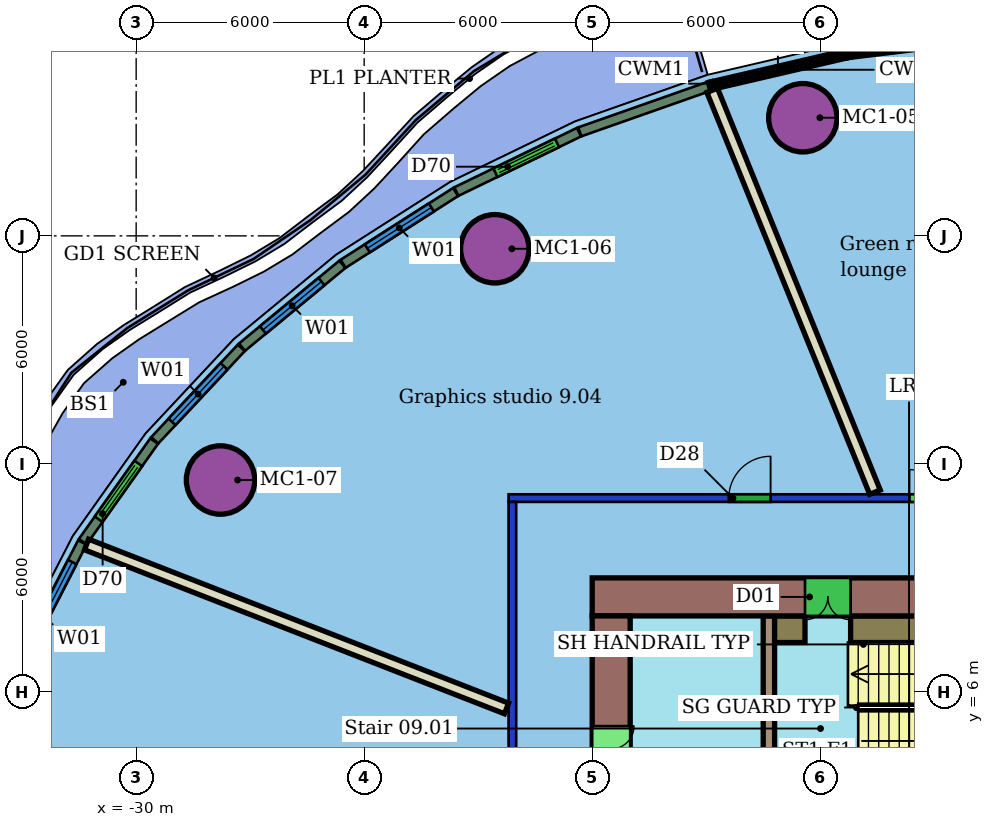
"""IFC4 building model, lengths in metres.
Left out: names, types, materials, properties, quantities, classifications, styles, units other than length and angle.
Written with IfcOpenShell. Run it as: python <this file> out.ifc"""

import sys

from ifc_helpers import new_model, si_unit, direction, frame, frame_2d, origin, origin_2d, place, context, subcontext, project, spatial, rectangle, hollow_circle, extrude, element, fill, save


model = new_model("IFC4")
c1 = context("Model", 3, precision=1e-05, world=origin(), true_north=direction((0.0, 1.0)))
c2 = subcontext(c1, "Body", "Model", "MODEL_VIEW")
j1 = project(units=[si_unit("LENGTHUNIT", "METRE"), si_unit("PLANEANGLEUNIT", "RADIAN")], contexts=[c1])
p1 = place(None, origin())
s1 = spatial("IfcSite", under=j1, at=p1, CompositionType="ELEMENT")
p2 = place(p1, origin())
s2 = spatial("IfcBuilding", under=s1, at=p2, CompositionType="ELEMENT")
p3 = place(p2, frame((0.0, 0.0, 50.8)))
s3 = spatial("IfcBuildingStorey", under=s2, at=p3, CompositionType="ELEMENT", Elevation=50.8)
for number, where, z_axis, x_axis in (
    (1, (-12.458, 21.108, 0.0), (0.0, 0.0, 1.0), (1.0, 0.0, 0.0)),
    (2, (-20.563, 17.66, 0.0), (0.0, 0.0, 1.0), (1.0, 0.0, 0.0)),
    (3, (-27.78, 11.576, 0.0), (0.0, 0.0, 1.0), (1.0, 0.0, 0.0)),
):
    element("IfcColumn", number, at=place(p3, frame(where, z_axis=z_axis, x_axis=x_axis)), inside=s3, PredefinedType="COLUMN", context=c2, shape_type="SweptSolid", body=[
        extrude(hollow_circle(Radius=0.9, WallThickness=0.06, at=origin_2d()), origin(), (0.0, 0.0, 1.0), 3.55),
    ])
p4 = place(p3, frame((-20.1, -11.0, 0.0), z_axis=(0.0, 0.0, 1.0), x_axis=(0.0, 1.0, 0.0)))
e4 = element("IfcWall", 4, at=p4, inside=s3, PredefinedType="PARTITIONING", context=c2, shape_type="SweptSolid", body=[
    extrude(rectangle(XDim=22.0, YDim=0.2, at=frame_2d((11.0, 0.0))), origin(), (0.0, 0.0, 1.0), 2.85),
])
p5 = place(p4, frame((11.659, 0.0, 0.0)))
e5 = element("IfcOpeningElement", 5, at=p5, cuts=e4, PredefinedType="OPENING", context=c2, shape_type="SweptSolid", body=[
    extrude(rectangle(XDim=1.8, YDim=2.1, at=frame_2d((0.9, 1.05))), frame((0.0, 0.11, 0.0), z_axis=(0.0, -1.0, 0.0), x_axis=(1.0, 0.0, 0.0)), (0.0, 0.0, 1.0), 0.22),
])
p6 = place(p4, frame((2.844, 0.0, 0.0)))
e6 = element("IfcOpeningElement", 6, at=p6, cuts=e4, PredefinedType="OPENING", context=c2, shape_type="SweptSolid", body=[
    extrude(rectangle(XDim=1.1, YDim=2.1, at=frame_2d((0.55, 1.05))), frame((0.0, 0.11, 0.0), z_axis=(0.0, -1.0, 0.0), x_axis=(1.0, 0.0, 0.0)), (0.0, 0.0, 1.0), 0.22),
])
p7 = place(p3, frame((-20.2, 11.1, 0.0), z_axis=(0.0, 0.0, 1.0), x_axis=(1.0, 0.0, 0.0)))
e7 = element("IfcWall", 7, at=p7, inside=s3, PredefinedType="PARTITIONING", context=c2, shape_type="SweptSolid", body=[
    extrude(rectangle(XDim=28.4, YDim=0.2, at=frame_2d((14.2, 0.0))), origin(), (0.0, 0.0, 1.0), 2.85),
])
p8 = place(p7, frame((19.389, 0.0, 0.0)))
e8 = element("IfcOpeningElement", 8, at=p8, cuts=e7, PredefinedType="OPENING", context=c2, shape_type="SweptSolid", body=[
    extrude(rectangle(XDim=1.2, YDim=2.1, at=frame_2d((0.6, 1.05))), frame((0.0, 0.11, 0.0), z_axis=(0.0, -1.0, 0.0), x_axis=(1.0, 0.0, 0.0)), (0.0, 0.0, 1.0), 0.22),
])
p9 = place(p7, frame((10.549, 0.0, 0.0)))
e9 = element("IfcOpeningElement", 9, at=p9, cuts=e7, PredefinedType="OPENING", context=c2, shape_type="SweptSolid", body=[
    extrude(rectangle(XDim=1.5, YDim=2.1, at=frame_2d((0.75, 1.05))), frame((0.0, 0.11, 0.0), z_axis=(0.0, -1.0, 0.0), x_axis=(1.0, 0.0, 0.0)), (0.0, 0.0, 1.0), 0.22),
])
p10 = place(p7, frame((5.794, 0.0, 0.0)))
e10 = element("IfcOpeningElement", 10, at=p10, cuts=e7, PredefinedType="OPENING", context=c2, shape_type="SweptSolid", body=[
    extrude(rectangle(XDim=1.1, YDim=2.1, at=frame_2d((0.55, 1.05))), frame((0.0, 0.11, 0.0), z_axis=(0.0, -1.0, 0.0), x_axis=(1.0, 0.0, 0.0)), (0.0, 0.0, 1.0), 0.22),
])
p11 = place(p3, frame((-14.842, 21.83, 0.0), z_axis=(0.0, 0.0, 1.0), x_axis=(0.375419963659, -0.926854816509, 0.0)))
e11 = element("IfcWall", 11, at=p11, inside=s3, PredefinedType="PARTITIONING", context=c2, shape_type="SweptSolid", body=[
    extrude(rectangle(XDim=11.408, YDim=0.3, at=frame_2d((5.704, 0.0))), origin(), (0.0, 0.0, 1.0), 3.55),
])
p12 = place(p3, frame((-31.304, 9.879, 0.0), z_axis=(0.0, 0.0, 1.0), x_axis=(0.931524907104, -0.363677532225, 0.0)))
e12 = element("IfcWall", 12, at=p12, inside=s3, PredefinedType="PARTITIONING", context=c2, shape_type="SweptSolid", body=[
    extrude(rectangle(XDim=11.862, YDim=0.3, at=frame_2d((5.931, 0.0))), origin(), (0.0, 0.0, 1.0), 3.55),
])
p13 = place(p3, frame((-14.929, 21.932, 0.0), z_axis=(0.0, 0.0, 1.0), x_axis=(-0.943313962697, -0.331901744168, 0.0)))
e13 = element("IfcWall", 13, at=p13, inside=s3, PredefinedType="SOLIDWALL", context=c2, shape_type="SweptSolid", body=[
    extrude(rectangle(XDim=3.602, YDim=0.25, at=frame_2d((1.801, 0.0))), origin(), (0.0, 0.0, 1.0), 3.15),
])
p14 = place(p3, frame((-18.347, 20.728, 0.0), z_axis=(0.0, 0.0, 1.0), x_axis=(-0.899966299965, -0.435959469363, 0.0)))
e14 = element("IfcWall", 14, at=p14, inside=s3, PredefinedType="SOLIDWALL", context=c2, shape_type="SweptSolid", body=[
    extrude(rectangle(XDim=3.586, YDim=0.25, at=frame_2d((1.793, 0.0))), origin(), (0.0, 0.0, 1.0), 3.15),
])
p15 = place(p14, frame((0.643, 0.0, 0.0)))
e15 = element("IfcOpeningElement", 15, at=p15, cuts=e14, PredefinedType="OPENING", context=c2, shape_type="SweptSolid", body=[
    extrude(rectangle(XDim=1.8, YDim=2.4, at=frame_2d((0.9, 1.2))), frame((0.0, 0.135, 0.0), z_axis=(0.0, -1.0, 0.0), x_axis=(1.0, 0.0, 0.0)), (0.0, 0.0, 1.0), 0.27),
])
p16 = place(p3, frame((-21.595, 19.154, 0.0), z_axis=(0.0, 0.0, 1.0), x_axis=(-0.843008079685, -0.53790089941, 0.0)))
e16 = element("IfcWall", 16, at=p16, inside=s3, PredefinedType="SOLIDWALL", context=c2, shape_type="SweptSolid", body=[
    extrude(rectangle(XDim=3.511, YDim=0.25, at=frame_2d((1.756, 0.0))), origin(), (0.0, 0.0, 1.0), 3.15),
])
p17 = place(p16, frame((0.756, 0.0, 0.8)))
e17 = element("IfcOpeningElement", 17, at=p17, cuts=e16, PredefinedType="OPENING", context=c2, shape_type="SweptSolid", body=[
    extrude(rectangle(XDim=2.0, YDim=2.2, at=frame_2d((1.0, 1.1))), frame((0.0, 0.135, 0.0), z_axis=(0.0, -1.0, 0.0), x_axis=(1.0, 0.0, 0.0)), (0.0, 0.0, 1.0), 0.27),
])
p18 = place(p3, frame((-24.573, 17.251, 0.0), z_axis=(0.0, 0.0, 1.0), x_axis=(-0.771145821292, -0.636658560222, 0.0)))
e18 = element("IfcWall", 18, at=p18, inside=s3, PredefinedType="SOLIDWALL", context=c2, shape_type="SweptSolid", body=[
    extrude(rectangle(XDim=3.426, YDim=0.25, at=frame_2d((1.713, 0.0))), origin(), (0.0, 0.0, 1.0), 3.15),
])
p19 = place(p18, frame((0.713, 0.0, 0.8)))
e19 = element("IfcOpeningElement", 19, at=p19, cuts=e18, PredefinedType="OPENING", context=c2, shape_type="SweptSolid", body=[
    extrude(rectangle(XDim=2.0, YDim=2.2, at=frame_2d((1.0, 1.1))), frame((0.0, 0.135, 0.0), z_axis=(0.0, -1.0, 0.0), x_axis=(1.0, 0.0, 0.0)), (0.0, 0.0, 1.0), 0.27),
])
p20 = place(p3, frame((-27.233, 15.054, 0.0), z_axis=(0.0, 0.0, 1.0), x_axis=(-0.683288117208, -0.730148853921, 0.0)))
e20 = element("IfcWall", 20, at=p20, inside=s3, PredefinedType="SOLIDWALL", context=c2, shape_type="SweptSolid", body=[
    extrude(rectangle(XDim=3.334, YDim=0.25, at=frame_2d((1.667, 0.0))), origin(), (0.0, 0.0, 1.0), 3.15),
])
p21 = place(p20, frame((0.667, 0.0, 0.8)))
e21 = element("IfcOpeningElement", 21, at=p21, cuts=e20, PredefinedType="OPENING", context=c2, shape_type="SweptSolid", body=[
    extrude(rectangle(XDim=2.0, YDim=2.2, at=frame_2d((1.0, 1.1))), frame((0.0, 0.135, 0.0), z_axis=(0.0, -1.0, 0.0), x_axis=(1.0, 0.0, 0.0)), (0.0, 0.0, 1.0), 0.27),
])
p22 = place(p3, frame((-29.527, 12.6, 0.0), z_axis=(0.0, 0.0, 1.0), x_axis=(-0.578643660536, -0.81558047679, 0.0)))
e22 = element("IfcWall", 22, at=p22, inside=s3, PredefinedType="SOLIDWALL", context=c2, shape_type="SweptSolid", body=[
    extrude(rectangle(XDim=3.244, YDim=0.25, at=frame_2d((1.622, 0.0))), origin(), (0.0, 0.0, 1.0), 3.15),
])
p23 = place(p22, frame((0.722, 0.0, 0.0)))
e23 = element("IfcOpeningElement", 23, at=p23, cuts=e22, PredefinedType="OPENING", context=c2, shape_type="SweptSolid", body=[
    extrude(rectangle(XDim=1.8, YDim=2.4, at=frame_2d((0.9, 1.2))), frame((0.0, 0.135, 0.0), z_axis=(0.0, -1.0, 0.0), x_axis=(1.0, 0.0, 0.0)), (0.0, 0.0, 1.0), 0.27),
])
p24 = place(p3, frame((-31.417, 9.932, 0.0), z_axis=(0.0, 0.0, 1.0), x_axis=(-0.457105364661, -0.889412550844, 0.0)))
e24 = element("IfcWall", 24, at=p24, inside=s3, PredefinedType="SOLIDWALL", context=c2, shape_type="SweptSolid", body=[
    extrude(rectangle(XDim=3.16, YDim=0.25, at=frame_2d((1.58, 0.0))), origin(), (0.0, 0.0, 1.0), 3.15),
])
p25 = place(p24, frame((0.58, 0.0, 0.8)))
e25 = element("IfcOpeningElement", 25, at=p25, cuts=e24, PredefinedType="OPENING", context=c2, shape_type="SweptSolid", body=[
    extrude(rectangle(XDim=2.0, YDim=2.2, at=frame_2d((1.0, 1.1))), frame((0.0, 0.135, 0.0), z_axis=(0.0, -1.0, 0.0), x_axis=(1.0, 0.0, 0.0)), (0.0, 0.0, 1.0), 0.27),
])
p26 = place(p3, frame((-6.0, 8.5, 0.0), z_axis=(0.0, 0.0, 1.0), x_axis=(-1.0, 0.0, 0.0)))
e26 = element("IfcWall", 26, at=p26, inside=s3, PredefinedType="SHEAR", context=c2, shape_type="SweptSolid", body=[
    extrude(rectangle(XDim=12.0, YDim=1.0, at=frame_2d((6.0, 0.0))), origin(), (0.0, 0.0, 1.0), 3.4),
])
p27 = place(p26, frame((5.2, 0.0, 0.0)))
e27 = element("IfcOpeningElement", 27, at=p27, cuts=e26, PredefinedType="OPENING", context=c2, shape_type="SweptSolid", body=[
    extrude(rectangle(XDim=1.2, YDim=2.1, at=frame_2d((0.6, 1.05))), frame((0.0, 0.51, 0.0), z_axis=(0.0, -1.0, 0.0), x_axis=(1.0, 0.0, 0.0)), (0.0, 0.0, 1.0), 1.02),
])
p28 = place(p3, frame((-17.5, 8.0, 0.0), z_axis=(0.0, 0.0, 1.0), x_axis=(0.0, -1.0, 0.0)))
e28 = element("IfcWall", 28, at=p28, inside=s3, PredefinedType="SHEAR", context=c2, shape_type="SweptSolid", body=[
    extrude(rectangle(XDim=16.0, YDim=1.0, at=frame_2d((8.0, 0.0))), origin(), (0.0, 0.0, 1.0), 3.4),
])
p29 = place(p28, frame((11.9, 0.0, 0.0)))
e29 = element("IfcOpeningElement", 29, at=p29, cuts=e28, PredefinedType="OPENING", context=c2, shape_type="SweptSolid", body=[
    extrude(rectangle(XDim=1.2, YDim=2.1, at=frame_2d((0.6, 1.05))), frame((0.0, 0.51, 0.0), z_axis=(0.0, -1.0, 0.0), x_axis=(1.0, 0.0, 0.0)), (0.0, 0.0, 1.0), 1.02),
])
p30 = place(p28, frame((2.9, 0.0, 0.0)))
e30 = element("IfcOpeningElement", 30, at=p30, cuts=e28, PredefinedType="OPENING", context=c2, shape_type="SweptSolid", body=[
    extrude(rectangle(XDim=1.2, YDim=2.1, at=frame_2d((0.6, 1.05))), frame((0.0, 0.51, 0.0), z_axis=(0.0, -1.0, 0.0), x_axis=(1.0, 0.0, 0.0)), (0.0, 0.0, 1.0), 1.02),
])
p31 = place(p3, frame((-13.35, 8.0, 0.0), z_axis=(0.0, 0.0, 1.0), x_axis=(0.0, -1.0, 0.0)))
e31 = element("IfcWall", 31, at=p31, inside=s3, PredefinedType="SHEAR", context=c2, shape_type="SweptSolid", body=[
    extrude(rectangle(XDim=16.0, YDim=0.3, at=frame_2d((8.0, 0.0))), origin(), (0.0, 0.0, 1.0), 3.4),
])
p32 = place(p31, frame((7.25, 0.0, 0.0)))
e32 = element("IfcOpeningElement", 32, at=p32, cuts=e31, PredefinedType="OPENING", context=c2, shape_type="SweptSolid", body=[
    extrude(rectangle(XDim=1.5, YDim=2.1, at=frame_2d((0.75, 1.05))), frame((0.0, 0.16, 0.0), z_axis=(0.0, -1.0, 0.0), x_axis=(1.0, 0.0, 0.0)), (0.0, 0.0, 1.0), 0.32),
])
p33 = place(p3, frame((-13.2, 7.65, 0.0), z_axis=(0.0, 0.0, 1.0), x_axis=(1.0, 0.0, 0.0)))
e33 = element("IfcWall", 33, at=p33, inside=s3, PredefinedType="SHEAR", context=c2, shape_type="SweptSolid", body=[
    extrude(rectangle(XDim=0.8, YDim=0.7, at=frame_2d((0.4, 0.0))), origin(), (0.0, 0.0, 1.0), 3.4),
])
p34 = place(p3, frame((-11.2, 7.65, 0.0), z_axis=(0.0, 0.0, 1.0), x_axis=(1.0, 0.0, 0.0)))
e34 = element("IfcWall", 34, at=p34, inside=s3, PredefinedType="SHEAR", context=c2, shape_type="SweptSolid", body=[
    extrude(rectangle(XDim=5.05, YDim=0.7, at=frame_2d((2.525, 0.0))), origin(), (0.0, 0.0, 1.0), 3.4),
])
p35 = place(p9, origin())
e35 = element("IfcDoor", 35, at=p35, inside=s3, OperationType="DOUBLE_DOOR_SINGLE_SWING", PredefinedType="DOOR", context=c2, shape_type="SweptSolid", body=[
    extrude(rectangle(XDim=1.5, YDim=2.1, at=frame_2d((0.75, 1.05))), frame((0.0, 0.025, 0.0), z_axis=(0.0, -1.0, 0.0), x_axis=(1.0, 0.0, 0.0)), (0.0, 0.0, 1.0), 0.05),
])
fill(e9, e35)
p36 = place(p10, origin())
e36 = element("IfcDoor", 36, at=p36, inside=s3, OperationType="SINGLE_SWING_RIGHT", PredefinedType="DOOR", context=c2, shape_type="SweptSolid", body=[
    extrude(rectangle(XDim=1.1, YDim=2.1, at=frame_2d((0.55, 1.05))), frame((0.0, 0.025, 0.0), z_axis=(0.0, -1.0, 0.0), x_axis=(1.0, 0.0, 0.0)), (0.0, 0.0, 1.0), 0.05),
])
fill(e10, e36)
p37 = place(p15, origin())
e37 = element("IfcDoor", 37, at=p37, inside=s3, OperationType="DOUBLE_DOOR_SLIDING", PredefinedType="DOOR", context=c2, shape_type="SweptSolid", body=[
    extrude(rectangle(XDim=1.8, YDim=2.4, at=frame_2d((0.9, 1.2))), frame((0.0, 0.025, 0.0), z_axis=(0.0, -1.0, 0.0), x_axis=(1.0, 0.0, 0.0)), (0.0, 0.0, 1.0), 0.05),
])
fill(e15, e37)
p38 = place(p17, origin())
e38 = element("IfcWindow", 38, at=p38, inside=s3, PartitioningType="SINGLE_PANEL", PredefinedType="WINDOW", context=c2, shape_type="SweptSolid", body=[
    extrude(rectangle(XDim=2.0, YDim=2.2, at=frame_2d((1.0, 1.1))), frame((0.0, 0.03, 0.0), z_axis=(0.0, -1.0, 0.0), x_axis=(1.0, 0.0, 0.0)), (0.0, 0.0, 1.0), 0.06),
])
fill(e17, e38)
p39 = place(p19, origin())
e39 = element("IfcWindow", 39, at=p39, inside=s3, PartitioningType="SINGLE_PANEL", PredefinedType="WINDOW", context=c2, shape_type="SweptSolid", body=[
    extrude(rectangle(XDim=2.0, YDim=2.2, at=frame_2d((1.0, 1.1))), frame((0.0, 0.03, 0.0), z_axis=(0.0, -1.0, 0.0), x_axis=(1.0, 0.0, 0.0)), (0.0, 0.0, 1.0), 0.06),
])
fill(e19, e39)
p40 = place(p21, origin())
e40 = element("IfcWindow", 40, at=p40, inside=s3, PartitioningType="SINGLE_PANEL", PredefinedType="WINDOW", context=c2, shape_type="SweptSolid", body=[
    extrude(rectangle(XDim=2.0, YDim=2.2, at=frame_2d((1.0, 1.1))), frame((0.0, 0.03, 0.0), z_axis=(0.0, -1.0, 0.0), x_axis=(1.0, 0.0, 0.0)), (0.0, 0.0, 1.0), 0.06),
])
fill(e21, e40)
p41 = place(p23, origin())
e41 = element("IfcDoor", 41, at=p41, inside=s3, OperationType="DOUBLE_DOOR_SLIDING", PredefinedType="DOOR", context=c2, shape_type="SweptSolid", body=[
    extrude(rectangle(XDim=1.8, YDim=2.4, at=frame_2d((0.9, 1.2))), frame((0.0, 0.025, 0.0), z_axis=(0.0, -1.0, 0.0), x_axis=(1.0, 0.0, 0.0)), (0.0, 0.0, 1.0), 0.05),
])
fill(e23, e41)
p42 = place(p25, origin())
e42 = element("IfcWindow", 42, at=p42, inside=s3, PartitioningType="SINGLE_PANEL", PredefinedType="WINDOW", context=c2, shape_type="SweptSolid", body=[
    extrude(rectangle(XDim=2.0, YDim=2.2, at=frame_2d((1.0, 1.1))), frame((0.0, 0.03, 0.0), z_axis=(0.0, -1.0, 0.0), x_axis=(1.0, 0.0, 0.0)), (0.0, 0.0, 1.0), 0.06),
])
fill(e25, e42)
p43 = place(p27, origin())
e43 = element("IfcDoor", 43, at=p43, inside=s3, OperationType="DOUBLE_DOOR_SINGLE_SWING", PredefinedType="NOTDEFINED", context=c2, shape_type="SweptSolid", body=[
    extrude(rectangle(XDim=1.2, YDim=2.1, at=frame_2d((0.6, 1.05))), frame((0.0, 0.025, 0.0), z_axis=(0.0, -1.0, 0.0), x_axis=(1.0, 0.0, 0.0)), (0.0, 0.0, 1.0), 0.05),
])
fill(e27, e43)
p44 = place(p30, origin())
e44 = element("IfcDoor", 44, at=p44, inside=s3, OperationType="DOUBLE_DOOR_SINGLE_SWING", PredefinedType="NOTDEFINED", context=c2, shape_type="SweptSolid", body=[
    extrude(rectangle(XDim=1.2, YDim=2.1, at=frame_2d((0.6, 1.05))), frame((0.0, 0.025, 0.0), z_axis=(0.0, -1.0, 0.0), x_axis=(1.0, 0.0, 0.0)), (0.0, 0.0, 1.0), 0.05),
])
fill(e30, e44)
save(model, sys.argv[1])
